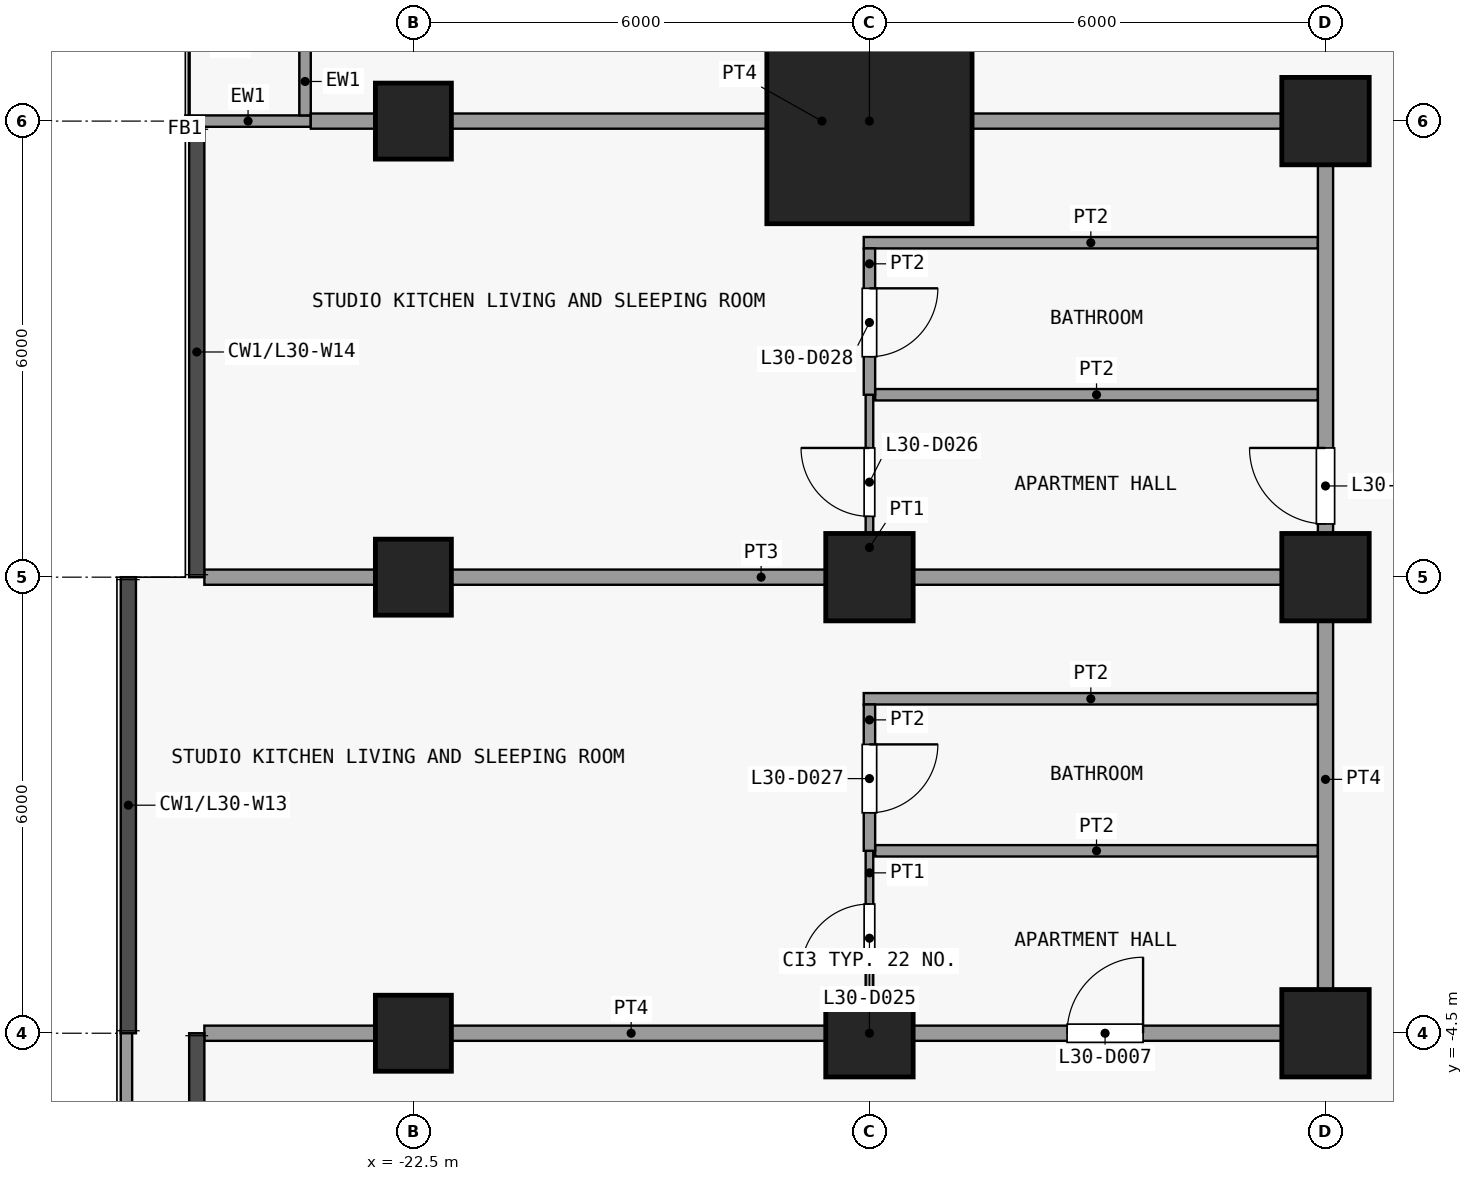
"""IFC4 building model, lengths in metres.
Left out: names, types, materials, properties, quantities, classifications, styles, units other than length and angle.
Written with IfcOpenShell. Run it as: python <this file> out.ifc"""

import sys

from ifc_helpers import new_model, si_unit, direction, frame, frame_2d, origin, origin_2d, place, context, subcontext, project, spatial, rectangle, extrude, element, fill, save


model = new_model("IFC4")
c1 = context("Model", 3, precision=1e-05, world=origin(), true_north=direction((0.0, 1.0)))
c2 = subcontext(c1, "Body", "Model", "MODEL_VIEW")
j1 = project(units=[si_unit("LENGTHUNIT", "METRE"), si_unit("PLANEANGLEUNIT", "RADIAN")], contexts=[c1])
p1 = place(None, origin())
s1 = spatial("IfcSite", under=j1, at=p1, CompositionType="ELEMENT")
p2 = place(p1, origin())
s2 = spatial("IfcBuilding", under=s1, at=p2, CompositionType="ELEMENT")
p3 = place(p2, frame((0.0, 0.0, 120.7)))
s3 = spatial("IfcBuildingStorey", under=s2, at=p3, CompositionType="ELEMENT", Elevation=120.7)
for number, where, z_axis, x_axis in (
    (1, (-22.5, -4.5, 0.0), (0.0, 0.0, 1.0), (1.0, 0.0, 0.0)),
    (2, (-22.5, 1.5, 0.0), (0.0, 0.0, 1.0), (1.0, 0.0, 0.0)),
    (3, (-22.5, 7.5, 0.0), (0.0, 0.0, 1.0), (1.0, 0.0, 0.0)),
):
    element("IfcColumn", number, at=place(p3, frame(where, z_axis=z_axis, x_axis=x_axis)), inside=s3, PredefinedType="COLUMN", context=c2, shape_type="SweptSolid", body=[
        extrude(rectangle(XDim=1.0, YDim=1.0, at=origin_2d()), origin(), (0.0, 0.0, 1.0), 3.6),
    ])
for number, where, z_axis, x_axis in (
    (4, (-16.5, -4.5, 0.0), (0.0, 0.0, 1.0), (1.0, 0.0, 0.0)),
    (5, (-16.5, 1.5, 0.0), (0.0, 0.0, 1.0), (1.0, 0.0, 0.0)),
):
    element("IfcColumn", number, at=place(p3, frame(where, z_axis=z_axis, x_axis=x_axis)), inside=s3, PredefinedType="COLUMN", context=c2, shape_type="SweptSolid", body=[
        extrude(rectangle(XDim=1.15, YDim=1.15, at=origin_2d()), origin(), (0.0, 0.0, 1.0), 3.6),
    ])
p4 = place(p3, frame((-16.5, 7.5, 0.0), z_axis=(0.0, 0.0, 1.0), x_axis=(1.0, 0.0, 0.0)))
e6 = element("IfcColumn", 6, at=p4, inside=s3, PredefinedType="COLUMN", context=c2, shape_type="SweptSolid", body=[
    extrude(rectangle(XDim=2.7, YDim=2.7, at=origin_2d()), origin(), (0.0, 0.0, 1.0), 3.6),
])
for number, where, z_axis, x_axis in (
    (7, (-10.5, -4.5, 0.0), (0.0, 0.0, 1.0), (1.0, 0.0, 0.0)),
    (8, (-10.5, 1.5, 0.0), (0.0, 0.0, 1.0), (1.0, 0.0, 0.0)),
    (9, (-10.5, 7.5, 0.0), (0.0, 0.0, 1.0), (1.0, 0.0, 0.0)),
):
    element("IfcColumn", number, at=place(p3, frame(where, z_axis=z_axis, x_axis=x_axis)), inside=s3, PredefinedType="COLUMN", context=c2, shape_type="SweptSolid", body=[
        extrude(rectangle(XDim=1.15, YDim=1.15, at=origin_2d()), origin(), (0.0, 0.0, 1.0), 3.6),
    ])
p5 = place(p3, frame((-23.85, 7.5, 0.0), z_axis=(0.0, 0.0, 1.0), x_axis=(-1.0, 0.0, 0.0)))
e10 = element("IfcWall", 10, at=p5, inside=s3, PredefinedType="SOLIDWALL", context=c2, shape_type="SweptSolid", body=[
    extrude(rectangle(XDim=1.65, YDim=0.15, at=frame_2d((0.825, 0.0))), origin(), (0.0, 0.0, 1.0), 3.3),
])
p6 = place(p3, frame((-23.925, 7.575, 0.0), z_axis=(0.0, 0.0, 1.0), x_axis=(0.0, 1.0, 0.0)))
e11 = element("IfcWall", 11, at=p6, inside=s3, PredefinedType="SOLIDWALL", context=c2, shape_type="SweptSolid", body=[
    extrude(rectangle(XDim=5.85, YDim=0.15, at=frame_2d((2.925, 0.0))), origin(), (0.0, 0.0, 1.0), 3.3),
])
p7 = place(p6, frame((3.825, 0.0, 0.0)))
e12 = element("IfcOpeningElement", 12, at=p7, cuts=e11, PredefinedType="OPENING", context=c2, shape_type="SweptSolid", body=[
    extrude(rectangle(XDim=1.2, YDim=2.4, at=frame_2d((0.6, 1.2))), frame((0.0, 0.085, 0.0), z_axis=(0.0, -1.0, 0.0), x_axis=(1.0, 0.0, 0.0)), (0.0, 0.0, 1.0), 0.17),
])
p8 = place(p6, frame((1.012, 0.0, 0.9)))
e13 = element("IfcOpeningElement", 13, at=p8, cuts=e11, PredefinedType="OPENING", context=c2, shape_type="SweptSolid", body=[
    extrude(rectangle(XDim=1.8, YDim=2.1, at=frame_2d((0.9, 1.05))), frame((0.0, 0.085, 0.0), z_axis=(0.0, -1.0, 0.0), x_axis=(1.0, 0.0, 0.0)), (0.0, 0.0, 1.0), 0.17),
])
p9 = place(p3, frame((-26.275, -13.3, 0.0), z_axis=(0.0, 0.0, 1.0), x_axis=(0.0, 1.0, 0.0)))
e14 = element("IfcWall", 14, at=p9, inside=s3, PredefinedType="PARAPET", context=c2, shape_type="SweptSolid", body=[
    extrude(rectangle(XDim=8.84, YDim=0.15, at=frame_2d((4.42, 0.0))), origin(), (0.0, 0.0, 1.0), 1.15),
])
p10 = place(p3, frame((-25.25, -4.5, 0.0), z_axis=(0.0, 0.0, 1.0), x_axis=(1.0, 0.0, 0.0)))
e15 = element("IfcWall", 15, at=p10, inside=s3, PredefinedType="PARTITIONING", context=c2, shape_type="SweptSolid", body=[
    extrude(rectangle(XDim=14.85, YDim=0.2, at=frame_2d((7.425, 0.0))), origin(), (0.0, 0.0, 1.0), 3.3),
])
p11 = place(p10, frame((11.35, 0.0, 0.0)))
e16 = element("IfcOpeningElement", 16, at=p11, cuts=e15, PredefinedType="OPENING", context=c2, shape_type="SweptSolid", body=[
    extrude(rectangle(XDim=1.0, YDim=2.1, at=frame_2d((0.5, 1.05))), frame((0.0, 0.11, 0.0), z_axis=(0.0, -1.0, 0.0), x_axis=(1.0, 0.0, 0.0)), (0.0, 0.0, 1.0), 0.22),
])
p12 = place(p3, frame((-16.425, -2.1, 0.0), z_axis=(0.0, 0.0, 1.0), x_axis=(1.0, 0.0, 0.0)))
e17 = element("IfcWall", 17, at=p12, inside=s3, PredefinedType="PARTITIONING", context=c2, shape_type="SweptSolid", body=[
    extrude(rectangle(XDim=5.825, YDim=0.15, at=frame_2d((2.913, 0.0))), origin(), (0.0, 0.0, 1.0), 3.3),
])
p13 = place(p3, frame((-16.575, -0.1, 0.0), z_axis=(0.0, 0.0, 1.0), x_axis=(1.0, 0.0, 0.0)))
e18 = element("IfcWall", 18, at=p13, inside=s3, PredefinedType="PARTITIONING", context=c2, shape_type="SweptSolid", body=[
    extrude(rectangle(XDim=5.975, YDim=0.15, at=frame_2d((2.987, 0.0))), origin(), (0.0, 0.0, 1.0), 3.3),
])
p14 = place(p3, frame((-25.25, 1.5, 0.0), z_axis=(0.0, 0.0, 1.0), x_axis=(1.0, 0.0, 0.0)))
e19 = element("IfcWall", 19, at=p14, inside=s3, PredefinedType="PARTITIONING", context=c2, shape_type="SweptSolid", body=[
    extrude(rectangle(XDim=14.65, YDim=0.2, at=frame_2d((7.325, 0.0))), origin(), (0.0, 0.0, 1.0), 3.3),
])
p15 = place(p3, frame((-16.425, 3.9, 0.0), z_axis=(0.0, 0.0, 1.0), x_axis=(1.0, 0.0, 0.0)))
e20 = element("IfcWall", 20, at=p15, inside=s3, PredefinedType="PARTITIONING", context=c2, shape_type="SweptSolid", body=[
    extrude(rectangle(XDim=5.825, YDim=0.15, at=frame_2d((2.913, 0.0))), origin(), (0.0, 0.0, 1.0), 3.3),
])
p16 = place(p3, frame((-16.575, 5.9, 0.0), z_axis=(0.0, 0.0, 1.0), x_axis=(1.0, 0.0, 0.0)))
e21 = element("IfcWall", 21, at=p16, inside=s3, PredefinedType="PARTITIONING", context=c2, shape_type="SweptSolid", body=[
    extrude(rectangle(XDim=5.975, YDim=0.15, at=frame_2d((2.987, 0.0))), origin(), (0.0, 0.0, 1.0), 3.3),
])
p17 = place(p3, frame((-23.85, 7.5, 0.0), z_axis=(0.0, 0.0, 1.0), x_axis=(1.0, 0.0, 0.0)))
e22 = element("IfcWall", 22, at=p17, inside=s3, PredefinedType="PARTITIONING", context=c2, shape_type="SweptSolid", body=[
    extrude(rectangle(XDim=13.45, YDim=0.2, at=frame_2d((6.725, 0.0))), origin(), (0.0, 0.0, 1.0), 3.3),
])
p18 = place(p3, frame((-16.5, -4.4, 0.0), z_axis=(0.0, 0.0, 1.0), x_axis=(0.0, 1.0, 0.0)))
e23 = element("IfcWall", 23, at=p18, inside=s3, PredefinedType="PARTITIONING", context=c2, shape_type="SweptSolid", body=[
    extrude(rectangle(XDim=2.3, YDim=0.1, at=frame_2d((1.15, 0.0))), origin(), (0.0, 0.0, 1.0), 3.3),
])
p19 = place(p18, frame((0.7, 0.0, 0.0)))
e24 = element("IfcOpeningElement", 24, at=p19, cuts=e23, PredefinedType="OPENING", context=c2, shape_type="SweptSolid", body=[
    extrude(rectangle(XDim=0.9, YDim=2.1, at=frame_2d((0.45, 1.05))), frame((0.0, 0.06, 0.0), z_axis=(0.0, -1.0, 0.0), x_axis=(1.0, 0.0, 0.0)), (0.0, 0.0, 1.0), 0.12),
])
p20 = place(p3, frame((-16.5, 1.6, 0.0), z_axis=(0.0, 0.0, 1.0), x_axis=(0.0, 1.0, 0.0)))
e25 = element("IfcWall", 25, at=p20, inside=s3, PredefinedType="PARTITIONING", context=c2, shape_type="SweptSolid", body=[
    extrude(rectangle(XDim=2.3, YDim=0.1, at=frame_2d((1.15, 0.0))), origin(), (0.0, 0.0, 1.0), 3.3),
])
p21 = place(p20, frame((0.7, 0.0, 0.0)))
e26 = element("IfcOpeningElement", 26, at=p21, cuts=e25, PredefinedType="OPENING", context=c2, shape_type="SweptSolid", body=[
    extrude(rectangle(XDim=0.9, YDim=2.1, at=frame_2d((0.45, 1.05))), frame((0.0, 0.06, 0.0), z_axis=(0.0, -1.0, 0.0), x_axis=(1.0, 0.0, 0.0)), (0.0, 0.0, 1.0), 0.12),
])
p22 = place(p3, frame((-16.5, -2.1, 0.0), z_axis=(0.0, 0.0, 1.0), x_axis=(0.0, 1.0, 0.0)))
e27 = element("IfcWall", 27, at=p22, inside=s3, PredefinedType="PARTITIONING", context=c2, shape_type="SweptSolid", body=[
    extrude(rectangle(XDim=1.925, YDim=0.15, at=frame_2d((0.962, 0.0))), origin(), (0.0, 0.0, 1.0), 3.3),
])
p23 = place(p22, frame((0.5, 0.0, 0.0)))
e28 = element("IfcOpeningElement", 28, at=p23, cuts=e27, PredefinedType="OPENING", context=c2, shape_type="SweptSolid", body=[
    extrude(rectangle(XDim=0.9, YDim=2.1, at=frame_2d((0.45, 1.05))), frame((0.0, 0.085, 0.0), z_axis=(0.0, -1.0, 0.0), x_axis=(1.0, 0.0, 0.0)), (0.0, 0.0, 1.0), 0.17),
])
p24 = place(p3, frame((-16.5, 3.9, 0.0), z_axis=(0.0, 0.0, 1.0), x_axis=(0.0, 1.0, 0.0)))
e29 = element("IfcWall", 29, at=p24, inside=s3, PredefinedType="PARTITIONING", context=c2, shape_type="SweptSolid", body=[
    extrude(rectangle(XDim=1.925, YDim=0.15, at=frame_2d((0.962, 0.0))), origin(), (0.0, 0.0, 1.0), 3.3),
])
p25 = place(p24, frame((0.5, 0.0, 0.0)))
e30 = element("IfcOpeningElement", 30, at=p25, cuts=e29, PredefinedType="OPENING", context=c2, shape_type="SweptSolid", body=[
    extrude(rectangle(XDim=0.9, YDim=2.1, at=frame_2d((0.45, 1.05))), frame((0.0, 0.085, 0.0), z_axis=(0.0, -1.0, 0.0), x_axis=(1.0, 0.0, 0.0)), (0.0, 0.0, 1.0), 0.17),
])
p26 = place(p3, frame((-10.5, -4.4, 0.0), z_axis=(0.0, 0.0, 1.0), x_axis=(0.0, 1.0, 0.0)))
e31 = element("IfcWall", 31, at=p26, inside=s3, PredefinedType="PARTITIONING", context=c2, shape_type="SweptSolid", body=[
    extrude(rectangle(XDim=11.8, YDim=0.2, at=frame_2d((5.9, 0.0))), origin(), (0.0, 0.0, 1.0), 3.3),
])
p27 = place(p26, frame((6.6, 0.0, 0.0)))
e32 = element("IfcOpeningElement", 32, at=p27, cuts=e31, PredefinedType="OPENING", context=c2, shape_type="SweptSolid", body=[
    extrude(rectangle(XDim=1.0, YDim=2.1, at=frame_2d((0.5, 1.05))), frame((0.0, 0.11, 0.0), z_axis=(0.0, -1.0, 0.0), x_axis=(1.0, 0.0, 0.0)), (0.0, 0.0, 1.0), 0.22),
])
p28 = place(p11, origin())
e33 = element("IfcDoor", 33, at=p28, inside=s3, OperationType="SINGLE_SWING_LEFT", PredefinedType="DOOR", context=c2, shape_type="SweptSolid", body=[
    extrude(rectangle(XDim=1.0, YDim=2.1, at=frame_2d((0.5, 1.05))), frame((0.0, 0.025, 0.0), z_axis=(0.0, -1.0, 0.0), x_axis=(1.0, 0.0, 0.0)), (0.0, 0.0, 1.0), 0.05),
])
fill(e16, e33)
p29 = place(p19, origin())
e34 = element("IfcDoor", 34, at=p29, inside=s3, OperationType="SINGLE_SWING_RIGHT", PredefinedType="DOOR", context=c2, shape_type="SweptSolid", body=[
    extrude(rectangle(XDim=0.9, YDim=2.1, at=frame_2d((0.45, 1.05))), frame((0.0, 0.025, 0.0), z_axis=(0.0, -1.0, 0.0), x_axis=(1.0, 0.0, 0.0)), (0.0, 0.0, 1.0), 0.05),
])
fill(e24, e34)
p30 = place(p21, origin())
e35 = element("IfcDoor", 35, at=p30, inside=s3, OperationType="SINGLE_SWING_LEFT", PredefinedType="DOOR", context=c2, shape_type="SweptSolid", body=[
    extrude(rectangle(XDim=0.9, YDim=2.1, at=frame_2d((0.45, 1.05))), frame((0.0, 0.025, 0.0), z_axis=(0.0, -1.0, 0.0), x_axis=(1.0, 0.0, 0.0)), (0.0, 0.0, 1.0), 0.05),
])
fill(e26, e35)
p31 = place(p23, origin())
e36 = element("IfcDoor", 36, at=p31, inside=s3, OperationType="SINGLE_SWING_RIGHT", PredefinedType="DOOR", context=c2, shape_type="SweptSolid", body=[
    extrude(rectangle(XDim=0.9, YDim=2.1, at=frame_2d((0.45, 1.05))), frame((0.0, 0.025, 0.0), z_axis=(0.0, -1.0, 0.0), x_axis=(1.0, 0.0, 0.0)), (0.0, 0.0, 1.0), 0.05),
])
fill(e28, e36)
p32 = place(p25, origin())
e37 = element("IfcDoor", 37, at=p32, inside=s3, OperationType="SINGLE_SWING_RIGHT", PredefinedType="DOOR", context=c2, shape_type="SweptSolid", body=[
    extrude(rectangle(XDim=0.9, YDim=2.1, at=frame_2d((0.45, 1.05))), frame((0.0, 0.025, 0.0), z_axis=(0.0, -1.0, 0.0), x_axis=(1.0, 0.0, 0.0)), (0.0, 0.0, 1.0), 0.05),
])
fill(e30, e37)
p33 = place(p27, origin())
e38 = element("IfcDoor", 38, at=p33, inside=s3, OperationType="SINGLE_SWING_LEFT", PredefinedType="DOOR", context=c2, shape_type="SweptSolid", body=[
    extrude(rectangle(XDim=1.0, YDim=2.1, at=frame_2d((0.5, 1.05))), frame((0.0, 0.025, 0.0), z_axis=(0.0, -1.0, 0.0), x_axis=(1.0, 0.0, 0.0)), (0.0, 0.0, 1.0), 0.05),
])
fill(e32, e38)
save(model, sys.argv[1])
